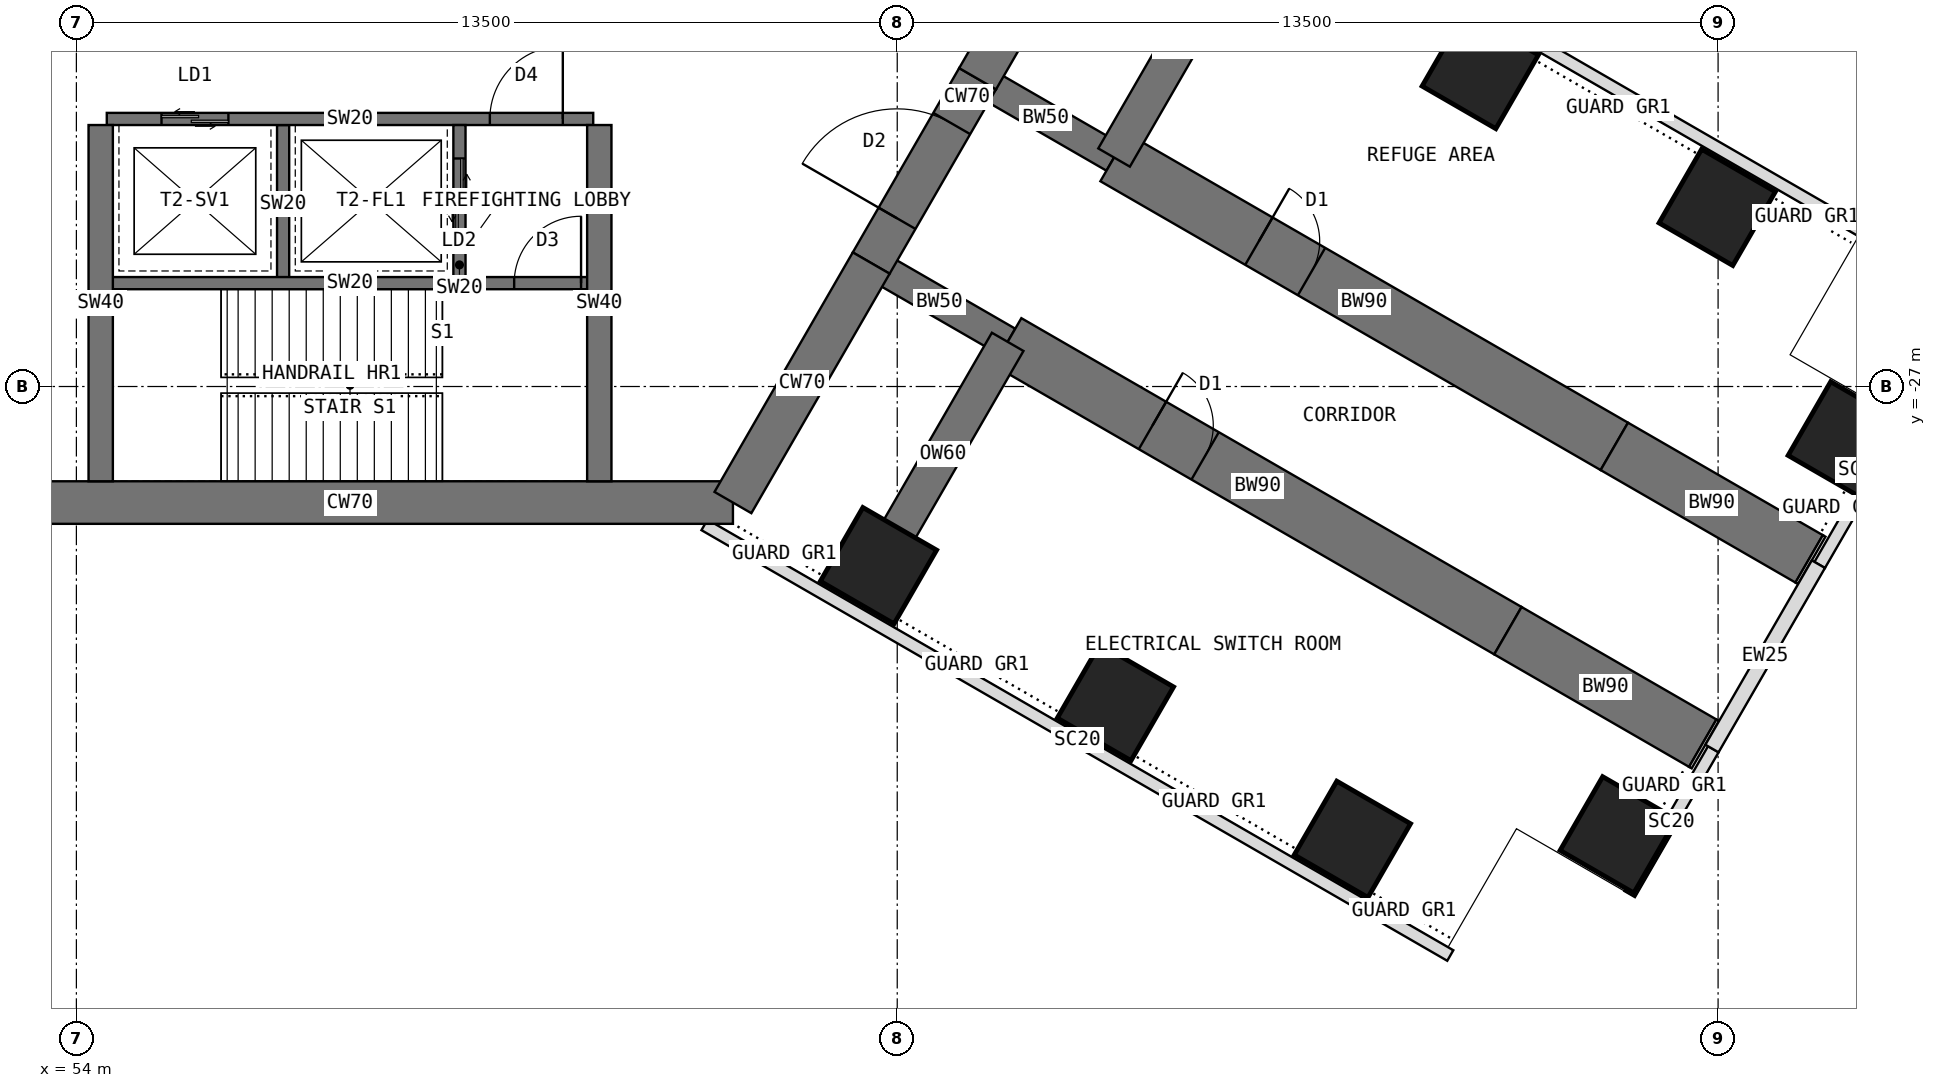
"""IFC4 building model, lengths in metres.
Left out: names, types, materials, properties, quantities, classifications, styles, units other than length and angle.
Written with IfcOpenShell. Run it as: python <this file> out.ifc"""

import sys

from ifc_helpers import new_model, si_unit, direction, frame, frame_2d, origin, origin_2d, place, context, subcontext, project, spatial, rectangle, extrude, element, fill, save


model = new_model("IFC4")
c1 = context("Model", 3, precision=1e-05, world=origin(), true_north=direction((0.0, 1.0)))
c2 = subcontext(c1, "Body", "Model", "MODEL_VIEW")
j1 = project(units=[si_unit("LENGTHUNIT", "METRE"), si_unit("PLANEANGLEUNIT", "RADIAN")], contexts=[c1])
p1 = place(None, origin())
s1 = spatial("IfcSite", under=j1, at=p1, CompositionType="ELEMENT")
p2 = place(p1, origin())
s2 = spatial("IfcBuilding", under=s1, at=p2, CompositionType="ELEMENT")
p3 = place(p2, frame((0.0, 0.0, 92.5)))
s3 = spatial("IfcBuildingStorey", under=s2, at=p3, CompositionType="ELEMENT", Elevation=92.5)
p4 = place(p3, frame((52.202, -28.908, 0.0), z_axis=(0.0, 0.0, 1.0), x_axis=(1.0, 0.0, 0.0)))
e1 = element("IfcWall", 1, at=p4, inside=s3, PredefinedType="SHEAR", context=c2, shape_type="SweptSolid", body=[
    extrude(rectangle(XDim=12.596, YDim=0.7, at=frame_2d((6.298, 0.0))), origin(), (0.0, 0.0, 1.0), 5.0),
])
p5 = place(p3, frame((64.798, -28.908, 0.0), z_axis=(0.0, 0.0, 1.0), x_axis=(0.499984222037, 0.866034513004, 0.0)))
e2 = element("IfcWall", 2, at=p5, inside=s3, PredefinedType="SHEAR", context=c2, shape_type="SweptSolid", body=[
    extrude(rectangle(XDim=4.548, YDim=0.7, at=frame_2d((2.274, 0.0))), origin(), (0.0, 0.0, 1.0), 5.0),
])
p6 = place(p3, frame((67.072, -24.97, 0.0), z_axis=(0.0, 0.0, 1.0), x_axis=(0.500010275428, 0.866019471182, 0.0)))
e3 = element("IfcWall", 3, at=p6, inside=s3, PredefinedType="SHEAR", context=c2, shape_type="SweptSolid", body=[
    extrude(rectangle(XDim=3.5, YDim=0.7, at=frame_2d((1.75, 0.0))), origin(), (0.0, 0.0, 1.0), 5.0),
])
p7 = place(p6, frame((0.85, 0.0, 0.0)))
e4 = element("IfcOpeningElement", 4, at=p7, cuts=e3, PredefinedType="OPENING", context=c2, shape_type="SweptSolid", body=[
    extrude(rectangle(XDim=1.8, YDim=2.1, at=frame_2d((0.9, 1.05))), frame((0.0, 0.36, 0.0), z_axis=(0.0, -1.0, 0.0), x_axis=(1.0, 0.0, 0.0)), (0.0, 0.0, 1.0), 0.72),
])
p8 = place(p3, frame((68.822, -21.939, 0.0), z_axis=(0.0, 0.0, 1.0), x_axis=(0.500024481964, 0.866011268655, 0.0)))
e5 = element("IfcWall", 5, at=p8, inside=s3, PredefinedType="SHEAR", context=c2, shape_type="SweptSolid", body=[
    extrude(rectangle(XDim=4.548, YDim=0.7, at=frame_2d((2.274, 0.0))), origin(), (0.0, 0.0, 1.0), 5.0),
])
p9 = place(p3, frame((68.822, -21.939, 0.0), z_axis=(0.0, 0.0, 1.0), x_axis=(0.866072649678, -0.499918158782, 0.0)))
e6 = element("IfcWall", 6, at=p9, inside=s3, PredefinedType="SHEAR", context=c2, shape_type="SweptSolid", body=[
    extrude(rectangle(XDim=2.592, YDim=0.5, at=frame_2d((1.296, 0.0))), origin(), (0.0, 0.0, 1.0), 5.0),
])
p10 = place(p3, frame((71.066, -23.234, 0.0), z_axis=(0.0, 0.0, 1.0), x_axis=(0.86602681393, -0.499997557548, 0.0)))
e7 = element("IfcWall", 7, at=p10, inside=s3, PredefinedType="SHEAR", context=c2, shape_type="SweptSolid", body=[
    extrude(rectangle(XDim=9.5, YDim=0.9, at=frame_2d((4.75, 0.0))), origin(), (0.0, 0.0, 1.0), 5.0),
])
p11 = place(p10, frame((2.75, 0.0, 0.0)))
e8 = element("IfcOpeningElement", 8, at=p11, cuts=e7, PredefinedType="OPENING", context=c2, shape_type="SweptSolid", body=[
    extrude(rectangle(XDim=1.0, YDim=2.1, at=frame_2d((0.5, 1.05))), frame((0.0, 0.46, 0.0), z_axis=(0.0, -1.0, 0.0), x_axis=(1.0, 0.0, 0.0)), (0.0, 0.0, 1.0), 0.92),
])
p12 = place(p3, frame((79.294, -27.984, 0.0), z_axis=(0.0, 0.0, 1.0), x_axis=(0.866000971088, -0.500042316284, 0.0)))
e9 = element("IfcWall", 9, at=p12, inside=s3, PredefinedType="SHEAR", context=c2, shape_type="SweptSolid", body=[
    extrude(rectangle(XDim=3.7, YDim=0.9, at=frame_2d((1.85, 0.0))), origin(), (0.0, 0.0, 1.0), 5.0),
])
p13 = place(p3, frame((67.072, -24.97, 0.0), z_axis=(0.0, 0.0, 1.0), x_axis=(0.866031863473, -0.499988811324, 0.0)))
e10 = element("IfcWall", 10, at=p13, inside=s3, PredefinedType="SHEAR", context=c2, shape_type="SweptSolid", body=[
    extrude(rectangle(XDim=2.592, YDim=0.5, at=frame_2d((1.296, 0.0))), origin(), (0.0, 0.0, 1.0), 5.0),
])
p14 = place(p3, frame((69.316, -26.266, 0.0), z_axis=(0.0, 0.0, 1.0), x_axis=(0.86602681393, -0.499997557548, 0.0)))
e11 = element("IfcWall", 11, at=p14, inside=s3, PredefinedType="SHEAR", context=c2, shape_type="SweptSolid", body=[
    extrude(rectangle(XDim=9.5, YDim=0.9, at=frame_2d((4.75, 0.0))), origin(), (0.0, 0.0, 1.0), 5.0),
])
p15 = place(p14, frame((2.75, 0.0, 0.0)))
e12 = element("IfcOpeningElement", 12, at=p15, cuts=e11, PredefinedType="OPENING", context=c2, shape_type="SweptSolid", body=[
    extrude(rectangle(XDim=1.0, YDim=2.1, at=frame_2d((0.5, 1.05))), frame((0.0, 0.46, 0.0), z_axis=(0.0, -1.0, 0.0), x_axis=(1.0, 0.0, 0.0)), (0.0, 0.0, 1.0), 0.92),
])
p16 = place(p3, frame((77.544, -31.016, 0.0), z_axis=(0.0, 0.0, 1.0), x_axis=(0.866029545028, -0.499992827086, 0.0)))
e13 = element("IfcWall", 13, at=p16, inside=s3, PredefinedType="SHEAR", context=c2, shape_type="SweptSolid", body=[
    extrude(rectangle(XDim=3.7, YDim=0.9, at=frame_2d((1.85, 0.0))), origin(), (0.0, 0.0, 1.0), 5.0),
])
for number, where, z_axis, x_axis in (
    (14, (67.191, -29.946, 0.0), (0.0, 0.0, 1.0), (0.5, 0.866, 0.0)),
    (15, (77.088, -21.804, 0.0), (0.0, 0.0, 1.0), (0.5, 0.866, 0.0)),
    (16, (71.088, -32.196, 0.0), (0.0, 0.0, 1.0), (0.5, 0.866, 0.0)),
    (17, (80.986, -24.054, 0.0), (0.0, 0.0, 1.0), (0.5, 0.866, 0.0)),
    (18, (74.986, -34.446, 0.0), (0.0, 0.0, 1.0), (0.5, 0.866, 0.0)),
    (19, (83.108, -27.877, 0.0), (0.0, 0.0, 1.0), (0.5, 0.866, 0.0)),
    (20, (79.358, -34.373, 0.0), (0.0, 0.0, 1.0), (0.5, 0.866, 0.0)),
):
    element("IfcColumn", number, at=place(p3, frame(where, z_axis=z_axis, x_axis=x_axis)), inside=s3, PredefinedType="COLUMN", context=c2, shape_type="SweptSolid", body=[
        extrude(rectangle(XDim=1.4, YDim=1.4, at=origin_2d()), origin(), (0.0, 0.0, 1.0), 5.0),
    ])
for number, where, z_axis, x_axis in (
    (21, (71.066, -23.234, 0.0), (0.0, 0.0, 1.0), (0.5, 0.866, 0.0)),
    (22, (69.316, -26.266, 0.0), (0.0, 0.0, 1.0), (-0.5, -0.866, 0.0)),
):
    element("IfcWall", number, at=place(p3, frame(where, z_axis=z_axis, x_axis=x_axis)), inside=s3, PredefinedType="SHEAR", context=c2, shape_type="SweptSolid", body=[
        extrude(rectangle(XDim=4.25, YDim=0.6, at=frame_2d((2.125, 0.0))), origin(), (0.0, 0.0, 1.0), 5.0),
    ])
for number, where, z_axis, x_axis in (
    (23, (71.18, -17.411, 0.0), (0.0, 0.0, 1.0), (0.866, -0.5, 0.0)),
    (24, (76.596, -36.357, 0.0), (0.0, 0.0, 1.0), (-0.866, 0.5, 0.0)),
):
    element("IfcWall", number, at=place(p3, frame(where, z_axis=z_axis, x_axis=x_axis)), inside=s3, PredefinedType="USERDEFINED", context=c2, shape_type="SweptSolid", body=[
        extrude(rectangle(XDim=14.163, YDim=0.2, at=frame_2d((7.082, 0.0))), origin(), (0.0, 0.0, 1.0), 4.8),
    ])
p17 = place(p3, frame((79.546, -35.347, 0.0), z_axis=(0.0, 0.0, 1.0), x_axis=(0.499996545922, 0.866027397988, 0.0)))
e25 = element("IfcWall", 25, at=p17, inside=s3, PredefinedType="USERDEFINED", context=c2, shape_type="SweptSolid", body=[
    extrude(rectangle(XDim=2.75, YDim=0.2, at=frame_2d((1.375, 0.0))), origin(), (0.0, 0.0, 1.0), 4.8),
])
p18 = place(p3, frame((80.899, -32.953, 0.0), z_axis=(0.0, 0.0, 1.0), x_axis=(0.499980071345, 0.866036909293, 0.0)))
e26 = element("IfcWall", 26, at=p18, inside=s3, PredefinedType="STANDARD", context=c2, shape_type="SweptSolid", body=[
    extrude(rectangle(XDim=3.5, YDim=0.25, at=frame_2d((1.75, 0.0))), origin(), (0.0, 0.0, 1.0), 4.8),
])
p19 = place(p3, frame((82.671, -29.935, 0.0), z_axis=(0.0, 0.0, 1.0), x_axis=(0.499996545922, 0.866027397988, 0.0)))
e27 = element("IfcWall", 27, at=p19, inside=s3, PredefinedType="USERDEFINED", context=c2, shape_type="SweptSolid", body=[
    extrude(rectangle(XDim=2.75, YDim=0.2, at=frame_2d((1.375, 0.0))), origin(), (0.0, 0.0, 1.0), 4.8),
])
p20 = place(p3, frame((82.498, -29.834, 0.0), z_axis=(0.0, 0.0, 1.0), x_axis=(0.867642581652, -0.497188445666, 0.0)))
e28 = element("IfcWall", 28, at=p20, inside=s3, PredefinedType="PARTITIONING", context=c2, shape_type="SweptSolid", body=[
    extrude(rectangle(XDim=0.05, YDim=0.9, at=frame_2d((0.025, 0.0))), origin(), (0.0, 0.0, 1.0), 4.8),
])
p21 = place(p3, frame((80.748, -32.865, 0.0), z_axis=(0.0, 0.0, 1.0), x_axis=(0.86553723574, -0.500844580232, 0.0)))
e29 = element("IfcWall", 29, at=p21, inside=s3, PredefinedType="PARTITIONING", context=c2, shape_type="SweptSolid", body=[
    extrude(rectangle(XDim=0.05, YDim=0.9, at=frame_2d((0.025, 0.0))), origin(), (0.0, 0.0, 1.0), 4.8),
])
p22 = place(p3, frame((54.5, -22.6, 0.0), z_axis=(0.0, 0.0, 1.0), x_axis=(1.0, 0.0, 0.0)))
e30 = element("IfcWall", 30, at=p22, inside=s3, PredefinedType="SHEAR", context=c2, shape_type="SweptSolid", body=[
    extrude(rectangle(XDim=8.0, YDim=0.2, at=frame_2d((4.0, 0.0))), origin(), (0.0, 0.0, 1.0), 5.0),
])
p23 = place(p22, frame((6.3, 0.0, 0.0)))
e31 = element("IfcOpeningElement", 31, at=p23, cuts=e30, PredefinedType="OPENING", context=c2, shape_type="SweptSolid", body=[
    extrude(rectangle(XDim=1.2, YDim=2.1, at=frame_2d((0.6, 1.05))), frame((0.0, 0.11, 0.0), z_axis=(0.0, -1.0, 0.0), x_axis=(1.0, 0.0, 0.0)), (0.0, 0.0, 1.0), 0.22),
])
p24 = place(p22, frame((0.9, 0.0, 0.0)))
e32 = element("IfcOpeningElement", 32, at=p24, cuts=e30, PredefinedType="OPENING", context=c2, shape_type="SweptSolid", body=[
    extrude(rectangle(XDim=1.1, YDim=2.2, at=frame_2d((0.55, 1.1))), frame((0.0, 0.11, 0.0), z_axis=(0.0, -1.0, 0.0), x_axis=(1.0, 0.0, 0.0)), (0.0, 0.0, 1.0), 0.22),
])
p25 = place(p3, frame((57.4, -22.7, 0.0), z_axis=(0.0, 0.0, 1.0), x_axis=(0.0, -1.0, 0.0)))
e33 = element("IfcWall", 33, at=p25, inside=s3, PredefinedType="SHEAR", context=c2, shape_type="SweptSolid", body=[
    extrude(rectangle(XDim=2.6, YDim=0.2, at=frame_2d((1.3, 0.0))), origin(), (0.0, 0.0, 1.0), 5.0),
])
p26 = place(p3, frame((60.3, -22.7, 0.0), z_axis=(0.0, 0.0, 1.0), x_axis=(0.0, -1.0, 0.0)))
e34 = element("IfcWall", 34, at=p26, inside=s3, PredefinedType="SHEAR", context=c2, shape_type="SweptSolid", body=[
    extrude(rectangle(XDim=2.6, YDim=0.2, at=frame_2d((1.3, 0.0))), origin(), (0.0, 0.0, 1.0), 5.0),
])
p27 = place(p26, frame((0.55, 0.0, 0.0)))
e35 = element("IfcOpeningElement", 35, at=p27, cuts=e34, PredefinedType="OPENING", context=c2, shape_type="SweptSolid", body=[
    extrude(rectangle(XDim=1.3, YDim=2.2, at=frame_2d((0.65, 1.1))), frame((0.0, 0.11, 0.0), z_axis=(0.0, -1.0, 0.0), x_axis=(1.0, 0.0, 0.0)), (0.0, 0.0, 1.0), 0.22),
])
p28 = place(p3, frame((54.5, -25.3, 0.0), z_axis=(0.0, 0.0, 1.0), x_axis=(1.0, 0.0, 0.0)))
e36 = element("IfcWall", 36, at=p28, inside=s3, PredefinedType="SHEAR", context=c2, shape_type="SweptSolid", body=[
    extrude(rectangle(XDim=8.0, YDim=0.2, at=frame_2d((4.0, 0.0))), origin(), (0.0, 0.0, 1.0), 5.0),
])
p29 = place(p28, frame((6.7, 0.0, 0.0)))
e37 = element("IfcOpeningElement", 37, at=p29, cuts=e36, PredefinedType="OPENING", context=c2, shape_type="SweptSolid", body=[
    extrude(rectangle(XDim=1.1, YDim=2.1, at=frame_2d((0.55, 1.05))), frame((0.0, 0.11, 0.0), z_axis=(0.0, -1.0, 0.0), x_axis=(1.0, 0.0, 0.0)), (0.0, 0.0, 1.0), 0.22),
])
for number, where, z_axis, x_axis in (
    (38, (62.6, -22.7, 0.0), (0.0, 0.0, 1.0), (0.0, -1.0, 0.0)),
    (39, (54.4, -22.7, 0.0), (0.0, 0.0, 1.0), (0.0, -1.0, 0.0)),
):
    element("IfcWall", number, at=place(p3, frame(where, z_axis=z_axis, x_axis=x_axis)), inside=s3, PredefinedType="SHEAR", context=c2, shape_type="SweptSolid", body=[
        extrude(rectangle(XDim=5.858, YDim=0.4, at=frame_2d((2.929, 0.0))), origin(), (0.0, 0.0, 1.0), 5.0),
    ])
p30 = place(p23, origin())
e40 = element("IfcDoor", 40, at=p30, inside=s3, OperationType="SINGLE_SWING_RIGHT", PredefinedType="DOOR", context=c2, shape_type="SweptSolid", body=[
    extrude(rectangle(XDim=1.2, YDim=2.1, at=frame_2d((0.6, 1.05))), frame((0.0, 0.025, 0.0), z_axis=(0.0, -1.0, 0.0), x_axis=(1.0, 0.0, 0.0)), (0.0, 0.0, 1.0), 0.05),
])
fill(e31, e40)
p31 = place(p27, origin())
e41 = element("IfcDoor", 41, at=p31, inside=s3, OperationType="DOUBLE_DOOR_SLIDING", PredefinedType="DOOR", context=c2, shape_type="SweptSolid", body=[
    extrude(rectangle(XDim=1.3, YDim=2.2, at=frame_2d((0.65, 1.1))), frame((0.0, 0.025, 0.0), z_axis=(0.0, -1.0, 0.0), x_axis=(1.0, 0.0, 0.0)), (0.0, 0.0, 1.0), 0.05),
])
fill(e35, e41)
p32 = place(p24, origin())
e42 = element("IfcDoor", 42, at=p32, inside=s3, OperationType="DOUBLE_DOOR_SLIDING", PredefinedType="DOOR", context=c2, shape_type="SweptSolid", body=[
    extrude(rectangle(XDim=1.1, YDim=2.2, at=frame_2d((0.55, 1.1))), frame((0.0, 0.025, 0.0), z_axis=(0.0, -1.0, 0.0), x_axis=(1.0, 0.0, 0.0)), (0.0, 0.0, 1.0), 0.05),
])
fill(e32, e42)
p33 = place(p29, origin())
e43 = element("IfcDoor", 43, at=p33, inside=s3, OperationType="SINGLE_SWING_RIGHT", PredefinedType="DOOR", context=c2, shape_type="SweptSolid", body=[
    extrude(rectangle(XDim=1.1, YDim=2.1, at=frame_2d((0.55, 1.05))), frame((0.0, 0.025, 0.0), z_axis=(0.0, -1.0, 0.0), x_axis=(1.0, 0.0, 0.0)), (0.0, 0.0, 1.0), 0.05),
])
fill(e37, e43)
p34 = place(p7, origin())
e44 = element("IfcDoor", 44, at=p34, inside=s3, OperationType="DOUBLE_DOOR_DOUBLE_SWING", PredefinedType="DOOR", context=c2, shape_type="SweptSolid", body=[
    extrude(rectangle(XDim=1.72, YDim=2.06, at=frame_2d((0.9, 1.03))), frame((0.0, 0.025, 0.0), z_axis=(0.0, -1.0, 0.0), x_axis=(1.0, 0.0, 0.0)), (0.0, 0.0, 1.0), 0.05),
    extrude(rectangle(XDim=0.04, YDim=2.1, at=frame_2d((0.02, 1.05))), frame((0.0, 0.35, 0.0), z_axis=(0.0, -1.0, 0.0), x_axis=(1.0, 0.0, 0.0)), (0.0, 0.0, 1.0), 0.699),
    extrude(rectangle(XDim=0.04, YDim=2.1, at=frame_2d((1.78, 1.05))), frame((0.0, 0.35, 0.0), z_axis=(0.0, -1.0, 0.0), x_axis=(1.0, 0.0, 0.0)), (0.0, 0.0, 1.0), 0.699),
    extrude(rectangle(XDim=1.72, YDim=0.04, at=frame_2d((0.9, 2.08))), frame((0.0, 0.35, 0.0), z_axis=(0.0, -1.0, 0.0), x_axis=(1.0, 0.0, 0.0)), (0.0, 0.0, 1.0), 0.699),
])
fill(e4, e44)
p35 = place(p11, origin())
e45 = element("IfcDoor", 45, at=p35, inside=s3, OperationType="SINGLE_SWING_LEFT", PredefinedType="DOOR", context=c2, shape_type="SweptSolid", body=[
    extrude(rectangle(XDim=0.92, YDim=2.06, at=frame_2d((0.5, 1.03))), frame((0.0, 0.025, 0.0), z_axis=(0.0, -1.0, 0.0), x_axis=(1.0, 0.0, 0.0)), (0.0, 0.0, 1.0), 0.05),
    extrude(rectangle(XDim=0.04, YDim=2.1, at=frame_2d((0.02, 1.05))), frame((0.0, 0.45, 0.0), z_axis=(0.0, -1.0, 0.0), x_axis=(1.0, 0.0, 0.0)), (0.0, 0.0, 1.0), 0.899),
    extrude(rectangle(XDim=0.04, YDim=2.1, at=frame_2d((0.98, 1.05))), frame((0.0, 0.45, 0.0), z_axis=(0.0, -1.0, 0.0), x_axis=(1.0, 0.0, 0.0)), (0.0, 0.0, 1.0), 0.899),
    extrude(rectangle(XDim=0.92, YDim=0.04, at=frame_2d((0.5, 2.08))), frame((0.0, 0.45, 0.0), z_axis=(0.0, -1.0, 0.0), x_axis=(1.0, 0.0, 0.0)), (0.0, 0.0, 1.0), 0.899),
])
fill(e8, e45)
p36 = place(p15, origin())
e46 = element("IfcDoor", 46, at=p36, inside=s3, OperationType="SINGLE_SWING_LEFT", PredefinedType="DOOR", context=c2, shape_type="SweptSolid", body=[
    extrude(rectangle(XDim=0.92, YDim=2.06, at=frame_2d((0.5, 1.03))), frame((0.0, 0.025, 0.0), z_axis=(0.0, -1.0, 0.0), x_axis=(1.0, 0.0, 0.0)), (0.0, 0.0, 1.0), 0.05),
    extrude(rectangle(XDim=0.04, YDim=2.1, at=frame_2d((0.02, 1.05))), frame((0.0, 0.45, 0.0), z_axis=(0.0, -1.0, 0.0), x_axis=(1.0, 0.0, 0.0)), (0.0, 0.0, 1.0), 0.899),
    extrude(rectangle(XDim=0.04, YDim=2.1, at=frame_2d((0.98, 1.05))), frame((0.0, 0.45, 0.0), z_axis=(0.0, -1.0, 0.0), x_axis=(1.0, 0.0, 0.0)), (0.0, 0.0, 1.0), 0.899),
    extrude(rectangle(XDim=0.92, YDim=0.04, at=frame_2d((0.5, 2.08))), frame((0.0, 0.45, 0.0), z_axis=(0.0, -1.0, 0.0), x_axis=(1.0, 0.0, 0.0)), (0.0, 0.0, 1.0), 0.899),
])
fill(e12, e46)
save(model, sys.argv[1])
